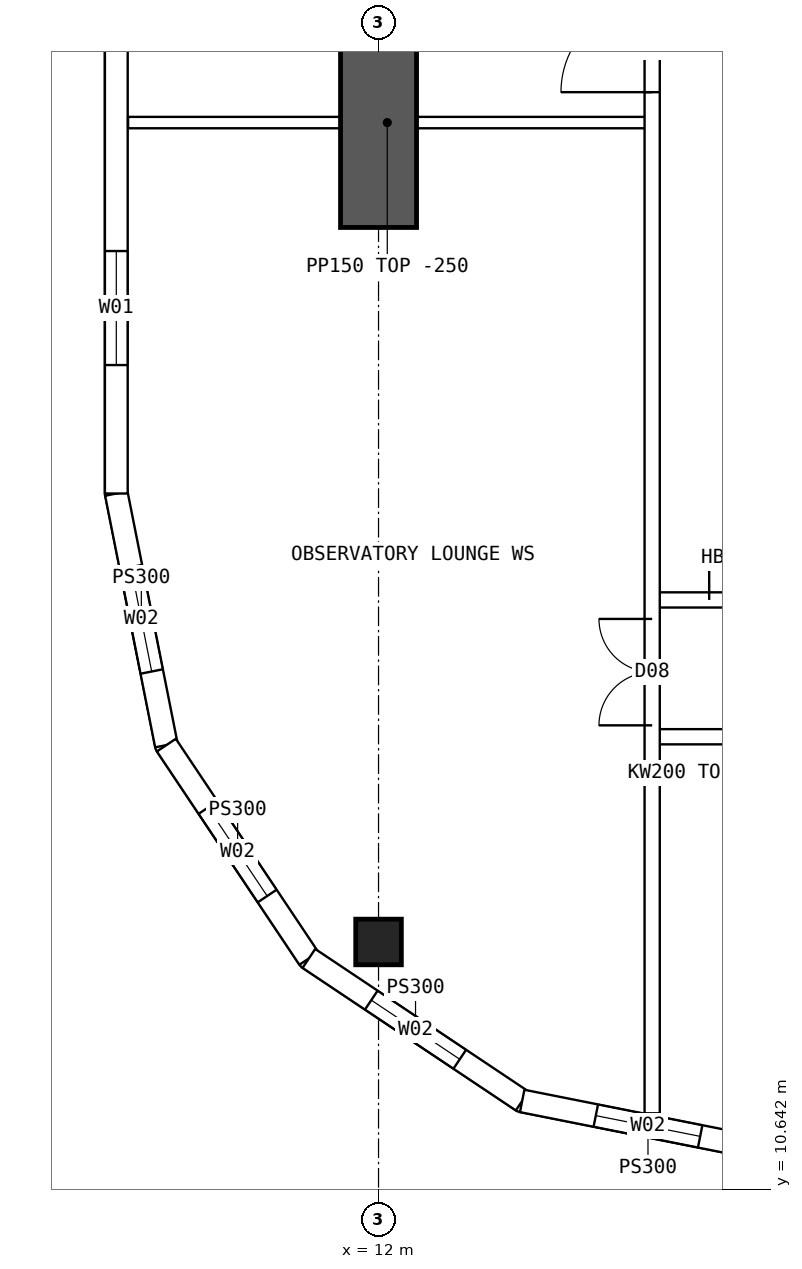
"""IFC4 building model, lengths in metres.
Left out: names, types, materials, properties, quantities, classifications, styles, units other than length and angle.
Written with IfcOpenShell. Run it as: python <this file> out.ifc"""

import sys

from ifc_helpers import new_model, si_unit, direction, frame, frame_2d, origin, origin_2d, place, context, subcontext, project, spatial, polyline, rectangle, hollow_rectangle, outline, extrude, element, fill, save


model = new_model("IFC4")
c1 = context("Model", 3, precision=1e-05, world=origin(), true_north=direction((0.0, 1.0)))
c2 = subcontext(c1, "Body", "Model", "MODEL_VIEW")
j1 = project(units=[si_unit("LENGTHUNIT", "METRE"), si_unit("PLANEANGLEUNIT", "RADIAN")], contexts=[c1])
p1 = place(None, origin())
s1 = spatial("IfcSite", under=j1, at=p1, CompositionType="ELEMENT")
p2 = place(p1, origin())
s2 = spatial("IfcBuilding", under=s1, at=p2, CompositionType="ELEMENT")
p3 = place(p2, frame((0.0, 0.0, 220.3)))
s3 = spatial("IfcBuildingStorey", under=s2, at=p3, CompositionType="ELEMENT", Elevation=220.3)
p4 = place(p3, frame((12.0, 13.9, 0.0), z_axis=(0.0, 0.0, 1.0), x_axis=(1.0, 0.0, 0.0)))
e1 = element("IfcColumn", 1, at=p4, inside=s3, PredefinedType="COLUMN", context=c2, shape_type="SweptSolid", body=[
    extrude(hollow_rectangle(XDim=0.6, YDim=0.6, WallThickness=0.06, at=origin_2d()), origin(), (0.0, 0.0, 1.0), 3.75),
])
p5 = place(p3, frame((12.0, 23.3, 0.0), z_axis=(0.0, 0.0, 1.0), x_axis=(0.0, 1.0, 0.0)))
e2 = element("IfcWall", 2, at=p5, inside=s3, PredefinedType="SHEAR", context=c2, shape_type="SweptSolid", body=[
    extrude(rectangle(XDim=5.0, YDim=1.0, at=frame_2d((2.5, 0.0))), origin(), (0.0, 0.0, 1.0), 3.75),
])
p6 = place(p3, frame((8.55, 44.2, 0.0), z_axis=(0.0, 0.0, 1.0), x_axis=(0.0, -1.0, 0.0)))
e3 = element("IfcWall", 3, at=p6, inside=s3, PredefinedType="SOLIDWALL", context=c2, shape_type="SweptSolid", body=[
    extrude(outline(polyline([(-0.015, -0.15), (24.415, -0.15), (24.385, 0.15), (0.015, 0.15), (-0.015, -0.15)])), origin(), (0.0, 0.0, 1.0), 3.5),
])
p7 = place(p6, frame((1.69, 0.0, 0.9)))
e4 = element("IfcOpeningElement", 4, at=p7, cuts=e3, PredefinedType="OPENING", context=c2, shape_type="SweptSolid", body=[
    extrude(rectangle(XDim=1.5, YDim=2.0, at=frame_2d((0.75, 1.0))), frame((0.0, 0.16, 0.0), z_axis=(0.0, -1.0, 0.0), x_axis=(1.0, 0.0, 0.0)), (0.0, 0.0, 1.0), 0.32),
])
p8 = place(p6, frame((6.57, 0.0, 0.9)))
e5 = element("IfcOpeningElement", 5, at=p8, cuts=e3, PredefinedType="OPENING", context=c2, shape_type="SweptSolid", body=[
    extrude(rectangle(XDim=1.5, YDim=2.0, at=frame_2d((0.75, 1.0))), frame((0.0, 0.16, 0.0), z_axis=(0.0, -1.0, 0.0), x_axis=(1.0, 0.0, 0.0)), (0.0, 0.0, 1.0), 0.32),
])
p9 = place(p6, frame((11.45, 0.0, 0.9)))
e6 = element("IfcOpeningElement", 6, at=p9, cuts=e3, PredefinedType="OPENING", context=c2, shape_type="SweptSolid", body=[
    extrude(rectangle(XDim=1.5, YDim=2.0, at=frame_2d((0.75, 1.0))), frame((0.0, 0.16, 0.0), z_axis=(0.0, -1.0, 0.0), x_axis=(1.0, 0.0, 0.0)), (0.0, 0.0, 1.0), 0.32),
])
p10 = place(p6, frame((16.33, 0.0, 0.9)))
e7 = element("IfcOpeningElement", 7, at=p10, cuts=e3, PredefinedType="OPENING", context=c2, shape_type="SweptSolid", body=[
    extrude(rectangle(XDim=1.5, YDim=2.0, at=frame_2d((0.75, 1.0))), frame((0.0, 0.16, 0.0), z_axis=(0.0, -1.0, 0.0), x_axis=(1.0, 0.0, 0.0)), (0.0, 0.0, 1.0), 0.32),
])
p11 = place(p6, frame((21.21, 0.0, 0.9)))
e8 = element("IfcOpeningElement", 8, at=p11, cuts=e3, PredefinedType="OPENING", context=c2, shape_type="SweptSolid", body=[
    extrude(rectangle(XDim=1.5, YDim=2.0, at=frame_2d((0.75, 1.0))), frame((0.0, 0.16, 0.0), z_axis=(0.0, -1.0, 0.0), x_axis=(1.0, 0.0, 0.0)), (0.0, 0.0, 1.0), 0.32),
])
p12 = place(p3, frame((8.55, 19.8, 0.0), z_axis=(0.0, 0.0, 1.0), x_axis=(0.19508664885, -0.980786011034, 0.0)))
e9 = element("IfcWall", 9, at=p12, inside=s3, PredefinedType="SOLIDWALL", context=c2, shape_type="SweptSolid", body=[
    extrude(outline(polyline([(-0.015, -0.15), (3.405, -0.15), (3.345, 0.15), (0.015, 0.15), (-0.015, -0.15)])), origin(), (0.0, 0.0, 1.0), 3.5),
])
p13 = place(p12, frame((0.988, 0.0, 0.9)))
e10 = element("IfcOpeningElement", 10, at=p13, cuts=e9, PredefinedType="OPENING", context=c2, shape_type="SweptSolid", body=[
    extrude(rectangle(XDim=1.4, YDim=1.8, at=frame_2d((0.7, 0.9))), frame((0.0, 0.16, 0.0), z_axis=(0.0, -1.0, 0.0), x_axis=(1.0, 0.0, 0.0)), (0.0, 0.0, 1.0), 0.32),
])
p14 = place(p3, frame((9.208, 16.49, 0.0), z_axis=(0.0, 0.0, 1.0), x_axis=(0.555567969291, -0.831471124873, 0.0)))
e11 = element("IfcWall", 11, at=p14, inside=s3, PredefinedType="SOLIDWALL", context=c2, shape_type="SweptSolid", body=[
    extrude(outline(polyline([(-0.03, -0.15), (3.405, -0.15), (3.345, 0.15), (0.03, 0.15), (-0.03, -0.15)])), origin(), (0.0, 0.0, 1.0), 3.5),
])
p15 = place(p14, frame((0.988, 0.0, 0.9)))
e12 = element("IfcOpeningElement", 12, at=p15, cuts=e11, PredefinedType="OPENING", context=c2, shape_type="SweptSolid", body=[
    extrude(rectangle(XDim=1.4, YDim=1.8, at=frame_2d((0.7, 0.9))), frame((0.0, 0.16, 0.0), z_axis=(0.0, -1.0, 0.0), x_axis=(1.0, 0.0, 0.0)), (0.0, 0.0, 1.0), 0.32),
])
p16 = place(p3, frame((11.083, 13.684, 0.0), z_axis=(0.0, 0.0, 1.0), x_axis=(0.831460037396, -0.555584562613, 0.0)))
e13 = element("IfcWall", 13, at=p16, inside=s3, PredefinedType="SOLIDWALL", context=c2, shape_type="SweptSolid", body=[
    extrude(outline(polyline([(-0.03, -0.15), (3.405, -0.15), (3.345, 0.15), (0.03, 0.15), (-0.03, -0.15)])), origin(), (0.0, 0.0, 1.0), 3.5),
])
p17 = place(p16, frame((0.988, 0.0, 0.9)))
e14 = element("IfcOpeningElement", 14, at=p17, cuts=e13, PredefinedType="OPENING", context=c2, shape_type="SweptSolid", body=[
    extrude(rectangle(XDim=1.4, YDim=1.8, at=frame_2d((0.7, 0.9))), frame((0.0, 0.16, 0.0), z_axis=(0.0, -1.0, 0.0), x_axis=(1.0, 0.0, 0.0)), (0.0, 0.0, 1.0), 0.32),
])
p18 = place(p3, frame((13.89, 11.808, 0.0), z_axis=(0.0, 0.0, 1.0), x_axis=(0.98078325777, -0.195100490205, 0.0)))
e15 = element("IfcWall", 15, at=p18, inside=s3, PredefinedType="SOLIDWALL", context=c2, shape_type="SweptSolid", body=[
    extrude(outline(polyline([(-0.03, -0.15), (3.405, -0.15), (3.345, 0.15), (0.03, 0.15), (-0.03, -0.15)])), origin(), (0.0, 0.0, 1.0), 3.5),
])
p19 = place(p18, frame((0.988, 0.0, 0.9)))
e16 = element("IfcOpeningElement", 16, at=p19, cuts=e15, PredefinedType="OPENING", context=c2, shape_type="SweptSolid", body=[
    extrude(rectangle(XDim=1.4, YDim=1.8, at=frame_2d((0.7, 0.9))), frame((0.0, 0.16, 0.0), z_axis=(0.0, -1.0, 0.0), x_axis=(1.0, 0.0, 0.0)), (0.0, 0.0, 1.0), 0.32),
])
p20 = place(p3, frame((15.6, 16.6, 0.0), z_axis=(0.0, 0.0, 1.0), x_axis=(1.0, 0.0, 0.0)))
e17 = element("IfcWall", 17, at=p20, inside=s3, PredefinedType="SOLIDWALL", context=c2, shape_type="SweptSolid", body=[
    extrude(rectangle(XDim=2.05, YDim=0.2, at=frame_2d((1.025, 0.0))), origin(), (0.0, 0.0, 1.0), 3.5),
])
p21 = place(p20, frame((0.95, 0.0, 0.0)))
e18 = element("IfcOpeningElement", 18, at=p21, cuts=e17, PredefinedType="OPENING", context=c2, shape_type="SweptSolid", body=[
    extrude(rectangle(XDim=0.9, YDim=2.1, at=frame_2d((0.45, 1.05))), frame((0.0, 0.11, 0.0), z_axis=(0.0, -1.0, 0.0), x_axis=(1.0, 0.0, 0.0)), (0.0, 0.0, 1.0), 0.22),
])
p22 = place(p3, frame((15.6, 18.4, 0.0), z_axis=(0.0, 0.0, 1.0), x_axis=(1.0, 0.0, 0.0)))
e19 = element("IfcWall", 19, at=p22, inside=s3, PredefinedType="SOLIDWALL", context=c2, shape_type="SweptSolid", body=[
    extrude(rectangle(XDim=2.05, YDim=0.2, at=frame_2d((1.025, 0.0))), origin(), (0.0, 0.0, 1.0), 3.5),
])
p23 = place(p22, frame((0.75, 0.0, 0.0)))
e20 = element("IfcOpeningElement", 20, at=p23, cuts=e19, PredefinedType="OPENING", context=c2, shape_type="SweptSolid", body=[
    extrude(rectangle(XDim=1.2, YDim=2.1, at=frame_2d((0.6, 1.05))), frame((0.0, 0.11, 0.0), z_axis=(0.0, -1.0, 0.0), x_axis=(1.0, 0.0, 0.0)), (0.0, 0.0, 1.0), 0.22),
])
p24 = place(p3, frame((15.6, 11.646, 0.0), z_axis=(0.0, 0.0, 1.0), x_axis=(0.0, 1.0, 0.0)))
e21 = element("IfcWall", 21, at=p24, inside=s3, PredefinedType="SOLIDWALL", context=c2, shape_type="SweptSolid", body=[
    extrude(rectangle(XDim=40.708, YDim=0.2, at=frame_2d((20.354, 0.0))), origin(), (0.0, 0.0, 1.0), 3.5),
])
p25 = place(p24, frame((13.434, 0.0, 0.0)))
e22 = element("IfcOpeningElement", 22, at=p25, cuts=e21, PredefinedType="OPENING", context=c2, shape_type="SweptSolid", body=[
    extrude(rectangle(XDim=1.2, YDim=2.1, at=frame_2d((0.6, 1.05))), frame((0.0, 0.11, 0.0), z_axis=(0.0, -1.0, 0.0), x_axis=(1.0, 0.0, 0.0)), (0.0, 0.0, 1.0), 0.22),
])
p26 = place(p24, frame((5.104, 0.0, 0.0)))
e23 = element("IfcOpeningElement", 23, at=p26, cuts=e21, PredefinedType="OPENING", context=c2, shape_type="SweptSolid", body=[
    extrude(rectangle(XDim=1.4, YDim=2.1, at=frame_2d((0.7, 1.05))), frame((0.0, 0.11, 0.0), z_axis=(0.0, -1.0, 0.0), x_axis=(1.0, 0.0, 0.0)), (0.0, 0.0, 1.0), 0.22),
])
p27 = place(p24, frame((34.104, 0.0, 0.0)))
e24 = element("IfcOpeningElement", 24, at=p27, cuts=e21, PredefinedType="OPENING", context=c2, shape_type="SweptSolid", body=[
    extrude(rectangle(XDim=1.4, YDim=2.1, at=frame_2d((0.7, 1.05))), frame((0.0, 0.11, 0.0), z_axis=(0.0, -1.0, 0.0), x_axis=(1.0, 0.0, 0.0)), (0.0, 0.0, 1.0), 0.22),
])
p28 = place(p3, frame((8.705, 24.68, 0.0), z_axis=(0.0, 0.0, 1.0), x_axis=(1.0, 0.0, 0.0)))
e25 = element("IfcWall", 25, at=p28, inside=s3, PredefinedType="PARTITIONING", context=c2, shape_type="SweptSolid", body=[
    extrude(rectangle(XDim=6.82, YDim=0.15, at=frame_2d((3.41, 0.0))), origin(), (0.0, 0.0, 1.0), 3.5),
])
p29 = place(p11, origin())
e26 = element("IfcWindow", 26, at=p29, inside=s3, PartitioningType="SINGLE_PANEL", PredefinedType="WINDOW", context=c2, shape_type="SweptSolid", body=[
    extrude(rectangle(XDim=1.5, YDim=2.0, at=frame_2d((0.75, 1.0))), frame((0.0, 0.03, 0.0), z_axis=(0.0, -1.0, 0.0), x_axis=(1.0, 0.0, 0.0)), (0.0, 0.0, 1.0), 0.06),
])
fill(e8, e26)
p30 = place(p13, origin())
e27 = element("IfcWindow", 27, at=p30, inside=s3, PartitioningType="SINGLE_PANEL", PredefinedType="WINDOW", context=c2, shape_type="SweptSolid", body=[
    extrude(rectangle(XDim=1.4, YDim=1.8, at=frame_2d((0.7, 0.9))), frame((0.0, 0.03, 0.0), z_axis=(0.0, -1.0, 0.0), x_axis=(1.0, 0.0, 0.0)), (0.0, 0.0, 1.0), 0.06),
])
fill(e10, e27)
p31 = place(p15, origin())
e28 = element("IfcWindow", 28, at=p31, inside=s3, PartitioningType="SINGLE_PANEL", PredefinedType="WINDOW", context=c2, shape_type="SweptSolid", body=[
    extrude(rectangle(XDim=1.4, YDim=1.8, at=frame_2d((0.7, 0.9))), frame((0.0, 0.03, 0.0), z_axis=(0.0, -1.0, 0.0), x_axis=(1.0, 0.0, 0.0)), (0.0, 0.0, 1.0), 0.06),
])
fill(e12, e28)
p32 = place(p17, origin())
e29 = element("IfcWindow", 29, at=p32, inside=s3, PartitioningType="SINGLE_PANEL", PredefinedType="WINDOW", context=c2, shape_type="SweptSolid", body=[
    extrude(rectangle(XDim=1.4, YDim=1.8, at=frame_2d((0.7, 0.9))), frame((0.0, 0.03, 0.0), z_axis=(0.0, -1.0, 0.0), x_axis=(1.0, 0.0, 0.0)), (0.0, 0.0, 1.0), 0.06),
])
fill(e14, e29)
p33 = place(p19, origin())
e30 = element("IfcWindow", 30, at=p33, inside=s3, PartitioningType="SINGLE_PANEL", PredefinedType="WINDOW", context=c2, shape_type="SweptSolid", body=[
    extrude(rectangle(XDim=1.4, YDim=1.8, at=frame_2d((0.7, 0.9))), frame((0.0, 0.03, 0.0), z_axis=(0.0, -1.0, 0.0), x_axis=(1.0, 0.0, 0.0)), (0.0, 0.0, 1.0), 0.06),
])
fill(e16, e30)
p34 = place(p23, origin())
e31 = element("IfcDoor", 31, at=p34, inside=s3, OperationType="DOUBLE_DOOR_SINGLE_SWING", PredefinedType="DOOR", context=c2, shape_type="SweptSolid", body=[
    extrude(rectangle(XDim=1.2, YDim=2.1, at=frame_2d((0.6, 1.05))), frame((0.0, 0.025, 0.0), z_axis=(0.0, -1.0, 0.0), x_axis=(1.0, 0.0, 0.0)), (0.0, 0.0, 1.0), 0.05),
])
fill(e20, e31)
p35 = place(p25, origin())
e32 = element("IfcDoor", 32, at=p35, inside=s3, OperationType="SINGLE_SWING_LEFT", PredefinedType="DOOR", context=c2, shape_type="SweptSolid", body=[
    extrude(rectangle(XDim=1.2, YDim=2.1, at=frame_2d((0.6, 1.05))), frame((0.0, 0.025, 0.0), z_axis=(0.0, -1.0, 0.0), x_axis=(1.0, 0.0, 0.0)), (0.0, 0.0, 1.0), 0.05),
])
fill(e22, e32)
p36 = place(p26, origin())
e33 = element("IfcDoor", 33, at=p36, inside=s3, OperationType="DOUBLE_DOOR_SINGLE_SWING", PredefinedType="DOOR", context=c2, shape_type="SweptSolid", body=[
    extrude(rectangle(XDim=1.4, YDim=2.1, at=frame_2d((0.7, 1.05))), frame((0.0, 0.025, 0.0), z_axis=(0.0, -1.0, 0.0), x_axis=(1.0, 0.0, 0.0)), (0.0, 0.0, 1.0), 0.05),
])
fill(e23, e33)
save(model, sys.argv[1])
